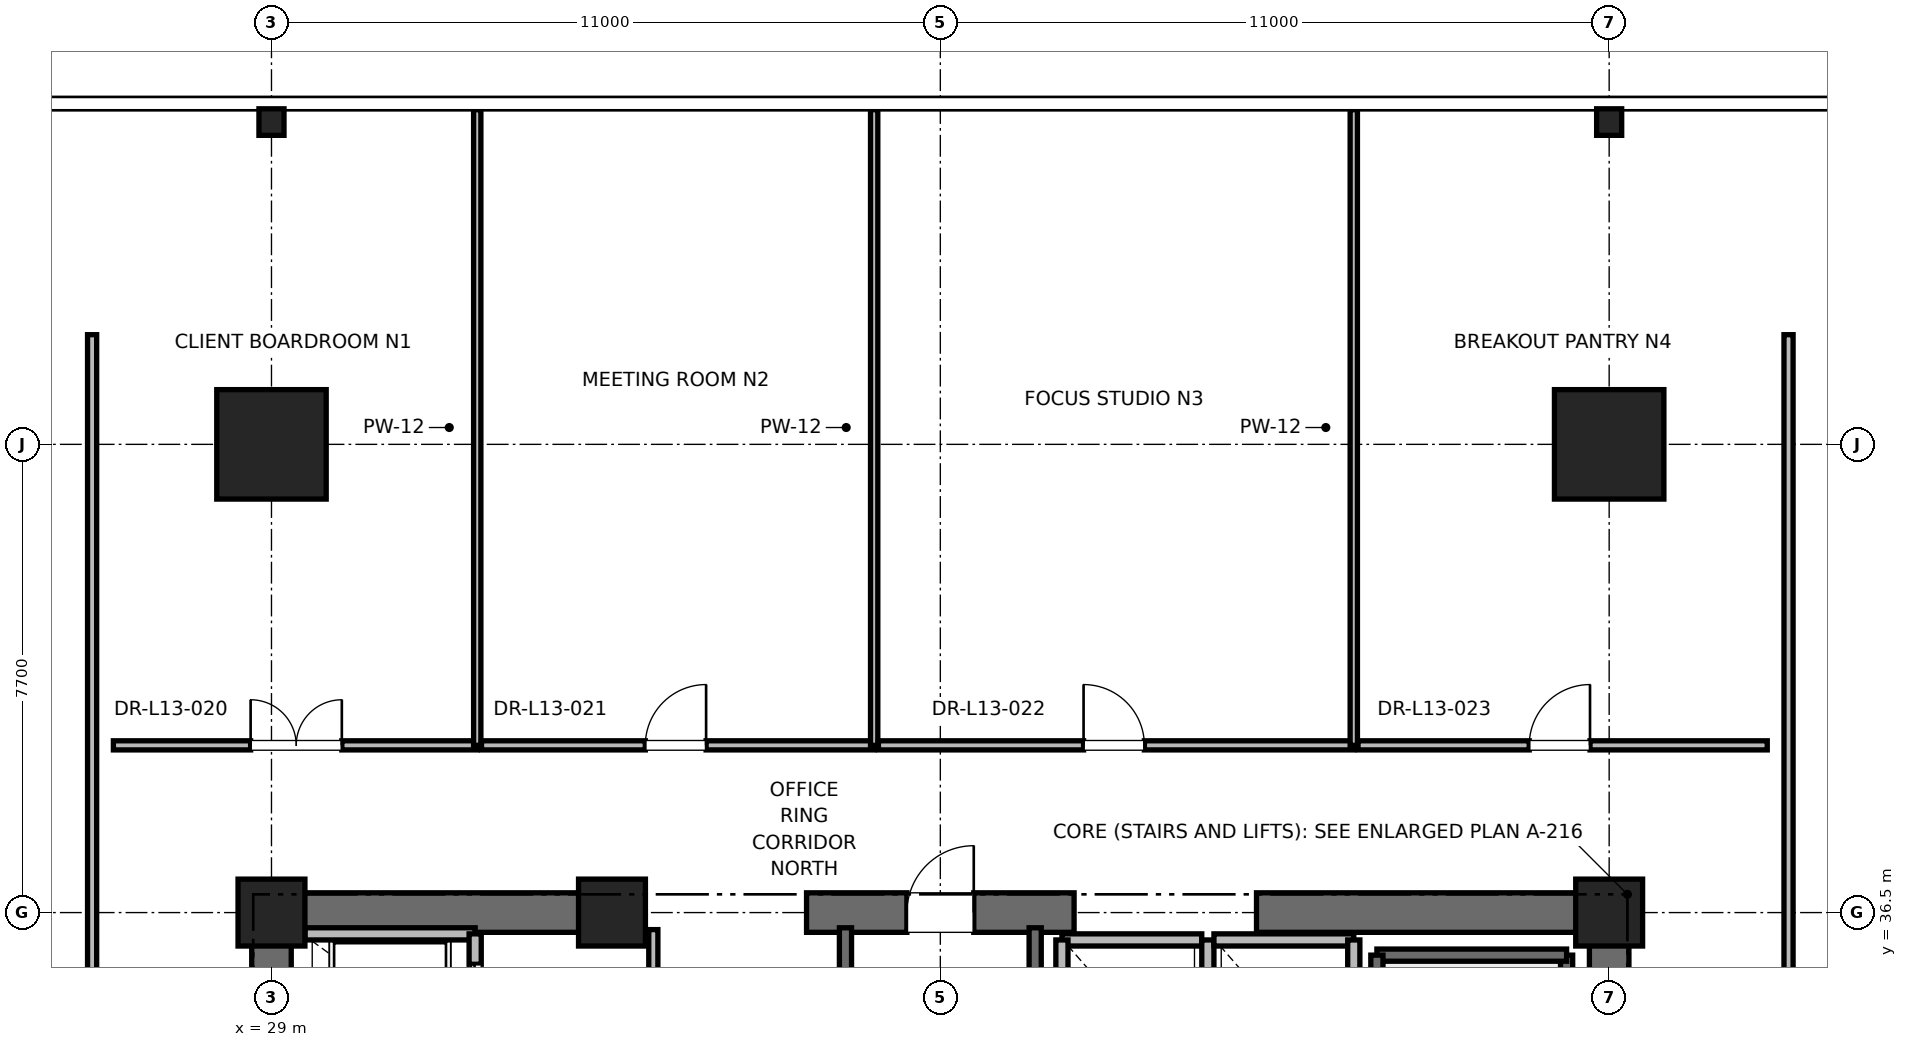
"""IFC4 building model, lengths in metres.
Left out: names, types, materials, properties, quantities, classifications, styles, units other than length and angle.
Written with IfcOpenShell. Run it as: python <this file> out.ifc"""

import sys

from ifc_helpers import new_model, si_unit, direction, frame, frame_2d, origin, origin_2d, place, context, subcontext, project, spatial, rectangle, i_section, extrude, element, fill, save


model = new_model("IFC4")
c1 = context("Model", 3, precision=1e-05, world=origin(), true_north=direction((0.0, 1.0)))
c2 = subcontext(c1, "Body", "Model", "MODEL_VIEW")
j1 = project(units=[si_unit("LENGTHUNIT", "METRE"), si_unit("PLANEANGLEUNIT", "RADIAN")], contexts=[c1])
p1 = place(None, origin())
s1 = spatial("IfcSite", under=j1, at=p1, CompositionType="ELEMENT")
p2 = place(p1, origin())
s2 = spatial("IfcBuilding", under=s1, at=p2, CompositionType="ELEMENT")
p3 = place(p2, frame((0.0, 0.0, 59.6)))
s3 = spatial("IfcBuildingStorey", under=s2, at=p3, CompositionType="ELEMENT", Elevation=59.6)
for number, where, z_axis, x_axis in (
    (1, (29.0, 44.2, 0.0), (0.0, 0.0, 1.0), (1.0, 0.0, 0.0)),
    (2, (51.0, 44.2, 0.0), (0.0, 0.0, 1.0), (1.0, 0.0, 0.0)),
):
    element("IfcColumn", number, at=place(p3, frame(where, z_axis=z_axis, x_axis=x_axis)), inside=s3, PredefinedType="COLUMN", context=c2, shape_type="SweptSolid", body=[
        extrude(rectangle(XDim=1.8, YDim=1.8, at=origin_2d()), origin(), (0.0, 0.0, 1.0), 4.0),
    ])
for number, where, z_axis, x_axis in (
    (3, (29.0, 49.5, 0.0), (0.0, 0.0, 1.0), (1.0, 0.0, 0.0)),
    (4, (51.0, 49.5, 0.0), (0.0, 0.0, 1.0), (1.0, 0.0, 0.0)),
):
    element("IfcColumn", number, at=place(p3, frame(where, z_axis=z_axis, x_axis=x_axis)), inside=s3, PredefinedType="COLUMN", context=c2, shape_type="SweptSolid", body=[
        extrude(i_section(OverallWidth=0.412, OverallDepth=0.437, WebThickness=0.036, FlangeThickness=0.058, FilletRadius=0.015, at=origin_2d()), origin(), (0.0, 0.0, 1.0), 4.0),
    ])
for number, where, z_axis, x_axis in (
    (5, (29.0, 36.5, 0.0), (0.0, 0.0, 1.0), (1.0, 0.0, 0.0)),
    (6, (51.0, 36.5, 0.0), (0.0, 0.0, 1.0), (1.0, 0.0, 0.0)),
    (7, (34.6, 36.5, 0.0), (0.0, 0.0, 1.0), (1.0, 0.0, 0.0)),
):
    element("IfcColumn", number, at=place(p3, frame(where, z_axis=z_axis, x_axis=x_axis)), inside=s3, PredefinedType="PILASTER", context=c2, shape_type="SweptSolid", body=[
        extrude(rectangle(XDim=1.1, YDim=1.1, at=origin_2d()), origin(), (0.0, 0.0, 1.0), 4.0),
    ])
p4 = place(p3, frame((29.0, 36.5, 0.0), z_axis=(0.0, 0.0, 1.0), x_axis=(1.0, 0.0, 0.0)))
e8 = element("IfcWall", 8, at=p4, inside=s3, PredefinedType="SHEAR", context=c2, shape_type="SweptSolid", body=[
    extrude(rectangle(XDim=5.8, YDim=0.65, at=frame_2d((2.9, 0.0))), origin(), (0.0, 0.0, 1.0), 3.76),
])
p5 = place(p3, frame((37.8, 36.5, 0.0), z_axis=(0.0, 0.0, 1.0), x_axis=(1.0, 0.0, 0.0)))
e9 = element("IfcWall", 9, at=p5, inside=s3, PredefinedType="SHEAR", context=c2, shape_type="SweptSolid", body=[
    extrude(rectangle(XDim=4.4, YDim=0.65, at=frame_2d((2.2, 0.0))), origin(), (0.0, 0.0, 1.0), 3.76),
])
p6 = place(p5, frame((1.65, 0.0, 0.0)))
e10 = element("IfcOpeningElement", 10, at=p6, cuts=e9, PredefinedType="OPENING", context=c2, shape_type="SweptSolid", body=[
    extrude(rectangle(XDim=1.1, YDim=2.15, at=frame_2d((0.55, 1.075))), frame((0.0, 0.325, 0.0), z_axis=(0.0, -1.0, 0.0), x_axis=(1.0, 0.0, 0.0)), (0.0, 0.0, 1.0), 0.65),
])
for number, where, z_axis, x_axis in (
    (11, (45.2, 36.5, 0.0), (0.0, 0.0, 1.0), (1.0, 0.0, 0.0)),
    (12, (29.0, 30.7, 0.0), (0.0, 0.0, 1.0), (0.0, 1.0, 0.0)),
):
    element("IfcWall", number, at=place(p3, frame(where, z_axis=z_axis, x_axis=x_axis)), inside=s3, PredefinedType="SHEAR", context=c2, shape_type="SweptSolid", body=[
        extrude(rectangle(XDim=5.8, YDim=0.65, at=frame_2d((2.9, 0.0))), origin(), (0.0, 0.0, 1.0), 3.76),
    ])
p7 = place(p3, frame((51.0, 27.7, 0.0), z_axis=(0.0, 0.0, 1.0), x_axis=(0.0, 1.0, 0.0)))
e13 = element("IfcWall", 13, at=p7, inside=s3, PredefinedType="SHEAR", context=c2, shape_type="SweptSolid", body=[
    extrude(rectangle(XDim=8.8, YDim=0.65, at=frame_2d((4.4, 0.0))), origin(), (0.0, 0.0, 1.0), 3.76),
])
p8 = place(p3, frame((50.3, 27.65, 0.0), z_axis=(0.0, 0.0, 1.0), x_axis=(0.0, 1.0, 0.0)))
e14 = element("IfcWall", 14, at=p8, inside=s3, PredefinedType="SOLIDWALL", context=c2, shape_type="SweptSolid", body=[
    extrude(rectangle(XDim=8.15, YDim=0.2, at=frame_2d((4.075, 0.0))), origin(), (0.0, 0.0, 1.0), 3.76),
])
p9 = place(p3, frame((47.18, 35.8, 0.0), z_axis=(0.0, 0.0, 1.0), x_axis=(1.0, 0.0, 0.0)))
e15 = element("IfcWall", 15, at=p9, inside=s3, PredefinedType="SOLIDWALL", context=c2, shape_type="SweptSolid", body=[
    extrude(rectangle(XDim=3.12, YDim=0.2, at=frame_2d((1.56, 0.0))), origin(), (0.0, 0.0, 1.0), 3.76),
])
p10 = place(p3, frame((47.18, 27.62, 0.0), z_axis=(0.0, 0.0, 1.0), x_axis=(0.0, 1.0, 0.0)))
e16 = element("IfcWall", 16, at=p10, inside=s3, PredefinedType="SOLIDWALL", context=c2, shape_type="SweptSolid", body=[
    extrude(rectangle(XDim=8.18, YDim=0.2, at=frame_2d((4.09, 0.0))), origin(), (0.0, 0.0, 1.0), 3.76),
])
p11 = place(p3, frame((38.44, 27.38, 0.0), z_axis=(0.0, 0.0, 1.0), x_axis=(0.0, 1.0, 0.0)))
e17 = element("IfcWall", 17, at=p11, inside=s3, PredefinedType="SOLIDWALL", context=c2, shape_type="SweptSolid", body=[
    extrude(rectangle(XDim=8.87, YDim=0.2, at=frame_2d((4.435, 0.0))), origin(), (0.0, 0.0, 1.0), 3.76),
])
p12 = place(p3, frame((41.56, 27.68, 0.0), z_axis=(0.0, 0.0, 1.0), x_axis=(0.0, 1.0, 0.0)))
e18 = element("IfcWall", 18, at=p12, inside=s3, PredefinedType="SOLIDWALL", context=c2, shape_type="SweptSolid", body=[
    extrude(rectangle(XDim=8.57, YDim=0.2, at=frame_2d((4.285, 0.0))), origin(), (0.0, 0.0, 1.0), 3.76),
])
p13 = place(p3, frame((32.35, 36.15, 0.0), z_axis=(0.0, 0.0, 1.0), x_axis=(-1.0, 0.0, 0.0)))
e19 = element("IfcWall", 19, at=p13, inside=s3, PredefinedType="SOLIDWALL", context=c2, shape_type="SweptSolid", body=[
    extrude(rectangle(XDim=2.8, YDim=0.2, at=frame_2d((1.4, 0.0))), origin(), (0.0, 0.0, 1.0), 2.889),
])
p14 = place(p3, frame((32.35, 34.05, 0.0), z_axis=(0.0, 0.0, 1.0), x_axis=(0.0, 1.0, 0.0)))
e20 = element("IfcWall", 20, at=p14, inside=s3, PredefinedType="SOLIDWALL", context=c2, shape_type="SweptSolid", body=[
    extrude(rectangle(XDim=2.1, YDim=0.2, at=frame_2d((1.05, 0.0))), origin(), (0.0, 0.0, 1.0), 3.76),
])
p15 = place(p14, frame((0.5, 0.0, 0.0)))
e21 = element("IfcOpeningElement", 21, at=p15, cuts=e20, PredefinedType="OPENING", context=c2, shape_type="SweptSolid", body=[
    extrude(rectangle(XDim=1.1, YDim=2.2, at=frame_2d((0.55, 1.1))), frame((0.0, 0.1, 0.0), z_axis=(0.0, -1.0, 0.0), x_axis=(1.0, 0.0, 0.0)), (0.0, 0.0, 1.0), 0.2),
])
p16 = place(p3, frame((44.3, 36.05, 0.0), z_axis=(0.0, 0.0, 1.0), x_axis=(-1.0, 0.0, 0.0)))
e22 = element("IfcWall", 22, at=p16, inside=s3, PredefinedType="SOLIDWALL", context=c2, shape_type="SweptSolid", body=[
    extrude(rectangle(XDim=2.3, YDim=0.2, at=frame_2d((1.15, 0.0))), origin(), (0.0, 0.0, 1.0), 2.54),
])
for number, where, z_axis, x_axis in (
    (23, (42.0, 36.05, 0.0), (0.0, 0.0, 1.0), (0.0, -1.0, 0.0)),
    (24, (44.4, 33.45, 0.0), (0.0, 0.0, 1.0), (0.0, 1.0, 0.0)),
):
    element("IfcWall", number, at=place(p3, frame(where, z_axis=z_axis, x_axis=x_axis)), inside=s3, PredefinedType="SOLIDWALL", context=c2, shape_type="SweptSolid", body=[
        extrude(rectangle(XDim=2.6, YDim=0.2, at=frame_2d((1.3, 0.0))), origin(), (0.0, 0.0, 1.0), 2.54),
    ])
p17 = place(p3, frame((46.8, 36.05, 0.0), z_axis=(0.0, 0.0, 1.0), x_axis=(-1.0, 0.0, 0.0)))
e25 = element("IfcWall", 25, at=p17, inside=s3, PredefinedType="SOLIDWALL", context=c2, shape_type="SweptSolid", body=[
    extrude(rectangle(XDim=2.3, YDim=0.2, at=frame_2d((1.15, 0.0))), origin(), (0.0, 0.0, 1.0), 2.54),
])
p18 = place(p3, frame((46.8, 33.45, 0.0), z_axis=(0.0, 0.0, 1.0), x_axis=(0.0, 1.0, 0.0)))
e26 = element("IfcWall", 26, at=p18, inside=s3, PredefinedType="SOLIDWALL", context=c2, shape_type="SweptSolid", body=[
    extrude(rectangle(XDim=2.6, YDim=0.2, at=frame_2d((1.3, 0.0))), origin(), (0.0, 0.0, 1.0), 3.76),
])
p19 = place(p3, frame((35.28, 33.95, 0.0), z_axis=(0.0, 0.0, 1.0), x_axis=(0.0, 1.0, 0.0)))
e27 = element("IfcWall", 27, at=p19, inside=s3, PredefinedType="PARTITIONING", context=c2, shape_type="SweptSolid", body=[
    extrude(rectangle(XDim=2.27, YDim=0.15, at=frame_2d((1.135, 0.0))), origin(), (0.0, 0.0, 1.0), 2.54),
])
p20 = place(p19, frame((0.66, 0.0, 0.0)))
e28 = element("IfcOpeningElement", 28, at=p20, cuts=e27, PredefinedType="OPENING", context=c2, shape_type="SweptSolid", body=[
    extrude(rectangle(XDim=0.95, YDim=2.15, at=frame_2d((0.475, 1.075))), frame((0.0, 0.075, 0.0), z_axis=(0.0, -1.0, 0.0), x_axis=(1.0, 0.0, 0.0)), (0.0, 0.0, 1.0), 0.15),
])
p21 = place(p3, frame((26.4, 39.25, 0.0), z_axis=(0.0, 0.0, 1.0), x_axis=(1.0, 0.0, 0.0)))
e29 = element("IfcWall", 29, at=p21, inside=s3, PredefinedType="PARTITIONING", context=c2, shape_type="SweptSolid", body=[
    extrude(rectangle(XDim=5.984, YDim=0.15, at=frame_2d((2.992, 0.0))), origin(), (0.0, 0.0, 1.0), 2.85),
])
p22 = place(p21, frame((2.257, 0.0, 0.0)))
e30 = element("IfcOpeningElement", 30, at=p22, cuts=e29, PredefinedType="OPENING", context=c2, shape_type="SweptSolid", body=[
    extrude(rectangle(XDim=1.5, YDim=2.25, at=frame_2d((0.75, 1.125))), frame((0.0, 0.075, 0.0), z_axis=(0.0, -1.0, 0.0), x_axis=(1.0, 0.0, 0.0)), (0.0, 0.0, 1.0), 0.15),
])
p23 = place(p3, frame((32.384, 39.25, 0.0), z_axis=(0.0, 0.0, 1.0), x_axis=(0.0, 1.0, 0.0)))
e31 = element("IfcWall", 31, at=p23, inside=s3, PredefinedType="PARTITIONING", context=c2, shape_type="SweptSolid", body=[
    extrude(rectangle(XDim=10.454, YDim=0.12, at=frame_2d((5.227, 0.0))), origin(), (0.0, 0.0, 1.0), 2.39),
])
p24 = place(p3, frame((32.454, 39.25, 0.0), z_axis=(0.0, 0.0, 1.0), x_axis=(1.0, 0.0, 0.0)))
e32 = element("IfcWall", 32, at=p24, inside=s3, PredefinedType="PARTITIONING", context=c2, shape_type="SweptSolid", body=[
    extrude(rectangle(XDim=6.458, YDim=0.15, at=frame_2d((3.229, 0.0))), origin(), (0.0, 0.0, 1.0), 2.85),
])
p25 = place(p24, frame((2.694, 0.0, 0.0)))
e33 = element("IfcOpeningElement", 33, at=p25, cuts=e32, PredefinedType="OPENING", context=c2, shape_type="SweptSolid", body=[
    extrude(rectangle(XDim=1.0, YDim=2.15, at=frame_2d((0.5, 1.075))), frame((0.0, 0.075, 0.0), z_axis=(0.0, -1.0, 0.0), x_axis=(1.0, 0.0, 0.0)), (0.0, 0.0, 1.0), 0.15),
])
p26 = place(p3, frame((38.912, 39.25, 0.0), z_axis=(0.0, 0.0, 1.0), x_axis=(0.0, 1.0, 0.0)))
e34 = element("IfcWall", 34, at=p26, inside=s3, PredefinedType="PARTITIONING", context=c2, shape_type="SweptSolid", body=[
    extrude(rectangle(XDim=10.454, YDim=0.12, at=frame_2d((5.227, 0.0))), origin(), (0.0, 0.0, 1.0), 2.39),
])
p27 = place(p3, frame((38.982, 39.25, 0.0), z_axis=(0.0, 0.0, 1.0), x_axis=(1.0, 0.0, 0.0)))
e35 = element("IfcWall", 35, at=p27, inside=s3, PredefinedType="PARTITIONING", context=c2, shape_type="SweptSolid", body=[
    extrude(rectangle(XDim=7.818, YDim=0.15, at=frame_2d((3.909, 0.0))), origin(), (0.0, 0.0, 1.0), 2.85),
])
p28 = place(p27, frame((3.374, 0.0, 0.0)))
e36 = element("IfcOpeningElement", 36, at=p28, cuts=e35, PredefinedType="OPENING", context=c2, shape_type="SweptSolid", body=[
    extrude(rectangle(XDim=1.0, YDim=2.15, at=frame_2d((0.5, 1.075))), frame((0.0, 0.075, 0.0), z_axis=(0.0, -1.0, 0.0), x_axis=(1.0, 0.0, 0.0)), (0.0, 0.0, 1.0), 0.15),
])
p29 = place(p3, frame((46.8, 39.25, 0.0), z_axis=(0.0, 0.0, 1.0), x_axis=(0.0, 1.0, 0.0)))
e37 = element("IfcWall", 37, at=p29, inside=s3, PredefinedType="PARTITIONING", context=c2, shape_type="SweptSolid", body=[
    extrude(rectangle(XDim=10.454, YDim=0.12, at=frame_2d((5.227, 0.0))), origin(), (0.0, 0.0, 1.0), 2.39),
])
p30 = place(p3, frame((46.87, 39.25, 0.0), z_axis=(0.0, 0.0, 1.0), x_axis=(1.0, 0.0, 0.0)))
e38 = element("IfcWall", 38, at=p30, inside=s3, PredefinedType="PARTITIONING", context=c2, shape_type="SweptSolid", body=[
    extrude(rectangle(XDim=6.73, YDim=0.15, at=frame_2d((3.365, 0.0))), origin(), (0.0, 0.0, 1.0), 2.85),
])
p31 = place(p30, frame((2.815, 0.0, 0.0)))
e39 = element("IfcOpeningElement", 39, at=p31, cuts=e38, PredefinedType="OPENING", context=c2, shape_type="SweptSolid", body=[
    extrude(rectangle(XDim=1.0, YDim=2.15, at=frame_2d((0.5, 1.075))), frame((0.0, 0.075, 0.0), z_axis=(0.0, -1.0, 0.0), x_axis=(1.0, 0.0, 0.0)), (0.0, 0.0, 1.0), 0.15),
])
p32 = place(p3, frame((26.05, 30.531, 0.0), z_axis=(0.0, 0.0, 1.0), x_axis=(0.0, 1.0, 0.0)))
e40 = element("IfcWall", 40, at=p32, inside=s3, PredefinedType="PARTITIONING", context=c2, shape_type="SweptSolid", body=[
    extrude(rectangle(XDim=15.473, YDim=0.15, at=frame_2d((7.737, 0.0))), origin(), (0.0, 0.0, 1.0), 2.85),
])
p33 = place(p32, frame((2.41, 0.0, 0.0)))
e41 = element("IfcOpeningElement", 41, at=p33, cuts=e40, PredefinedType="OPENING", context=c2, shape_type="SweptSolid", body=[
    extrude(rectangle(XDim=1.05, YDim=2.2, at=frame_2d((0.525, 1.1))), frame((0.0, 0.075, 0.0), z_axis=(0.0, -1.0, 0.0), x_axis=(1.0, 0.0, 0.0)), (0.0, 0.0, 1.0), 0.15),
])
p34 = place(p3, frame((53.95, 32.011, 0.0), z_axis=(0.0, 0.0, 1.0), x_axis=(0.0, 1.0, 0.0)))
e42 = element("IfcWall", 42, at=p34, inside=s3, PredefinedType="PARTITIONING", context=c2, shape_type="SweptSolid", body=[
    extrude(rectangle(XDim=13.993, YDim=0.15, at=frame_2d((6.996, 0.0))), origin(), (0.0, 0.0, 1.0), 2.85),
])
p35 = place(p34, frame((1.695, 0.0, 0.0)))
e43 = element("IfcOpeningElement", 43, at=p35, cuts=e42, PredefinedType="OPENING", context=c2, shape_type="SweptSolid", body=[
    extrude(rectangle(XDim=1.0, YDim=2.15, at=frame_2d((0.5, 1.075))), frame((0.0, 0.075, 0.0), z_axis=(0.0, -1.0, 0.0), x_axis=(1.0, 0.0, 0.0)), (0.0, 0.0, 1.0), 0.15),
])
p36 = place(p6, origin())
e44 = element("IfcDoor", 44, at=p36, inside=s3, OperationType="SINGLE_SWING_RIGHT", PredefinedType="DOOR", context=c2, shape_type="SweptSolid", body=[
    extrude(rectangle(XDim=1.1, YDim=2.15, at=frame_2d((0.55, 1.075))), frame((0.0, 0.025, 0.0), z_axis=(0.0, -1.0, 0.0), x_axis=(1.0, 0.0, 0.0)), (0.0, 0.0, 1.0), 0.05),
])
fill(e10, e44)
p37 = place(p15, origin())
e45 = element("IfcDoor", 45, at=p37, inside=s3, OperationType="SLIDING_TO_RIGHT", PredefinedType="DOOR", context=c2, shape_type="SweptSolid", body=[
    extrude(rectangle(XDim=1.1, YDim=2.2, at=frame_2d((0.55, 1.1))), frame((0.0, 0.025, 0.0), z_axis=(0.0, -1.0, 0.0), x_axis=(1.0, 0.0, 0.0)), (0.0, 0.0, 1.0), 0.05),
])
fill(e21, e45)
p38 = place(p22, origin())
e46 = element("IfcDoor", 46, at=p38, inside=s3, OperationType="DOUBLE_DOOR_SINGLE_SWING", PredefinedType="DOOR", context=c2, shape_type="SweptSolid", body=[
    extrude(rectangle(XDim=1.5, YDim=2.25, at=frame_2d((0.75, 1.125))), frame((0.0, 0.025, 0.0), z_axis=(0.0, -1.0, 0.0), x_axis=(1.0, 0.0, 0.0)), (0.0, 0.0, 1.0), 0.05),
])
fill(e30, e46)
p39 = place(p25, origin())
e47 = element("IfcDoor", 47, at=p39, inside=s3, OperationType="SINGLE_SWING_RIGHT", PredefinedType="DOOR", context=c2, shape_type="SweptSolid", body=[
    extrude(rectangle(XDim=1.0, YDim=2.15, at=frame_2d((0.5, 1.075))), frame((0.0, 0.025, 0.0), z_axis=(0.0, -1.0, 0.0), x_axis=(1.0, 0.0, 0.0)), (0.0, 0.0, 1.0), 0.05),
])
fill(e33, e47)
p40 = place(p28, origin())
e48 = element("IfcDoor", 48, at=p40, inside=s3, OperationType="SINGLE_SWING_LEFT", PredefinedType="DOOR", context=c2, shape_type="SweptSolid", body=[
    extrude(rectangle(XDim=1.0, YDim=2.15, at=frame_2d((0.5, 1.075))), frame((0.0, 0.025, 0.0), z_axis=(0.0, -1.0, 0.0), x_axis=(1.0, 0.0, 0.0)), (0.0, 0.0, 1.0), 0.05),
])
fill(e36, e48)
p41 = place(p31, origin())
e49 = element("IfcDoor", 49, at=p41, inside=s3, OperationType="SINGLE_SWING_RIGHT", PredefinedType="DOOR", context=c2, shape_type="SweptSolid", body=[
    extrude(rectangle(XDim=1.0, YDim=2.15, at=frame_2d((0.5, 1.075))), frame((0.0, 0.025, 0.0), z_axis=(0.0, -1.0, 0.0), x_axis=(1.0, 0.0, 0.0)), (0.0, 0.0, 1.0), 0.05),
])
fill(e39, e49)
save(model, sys.argv[1])
